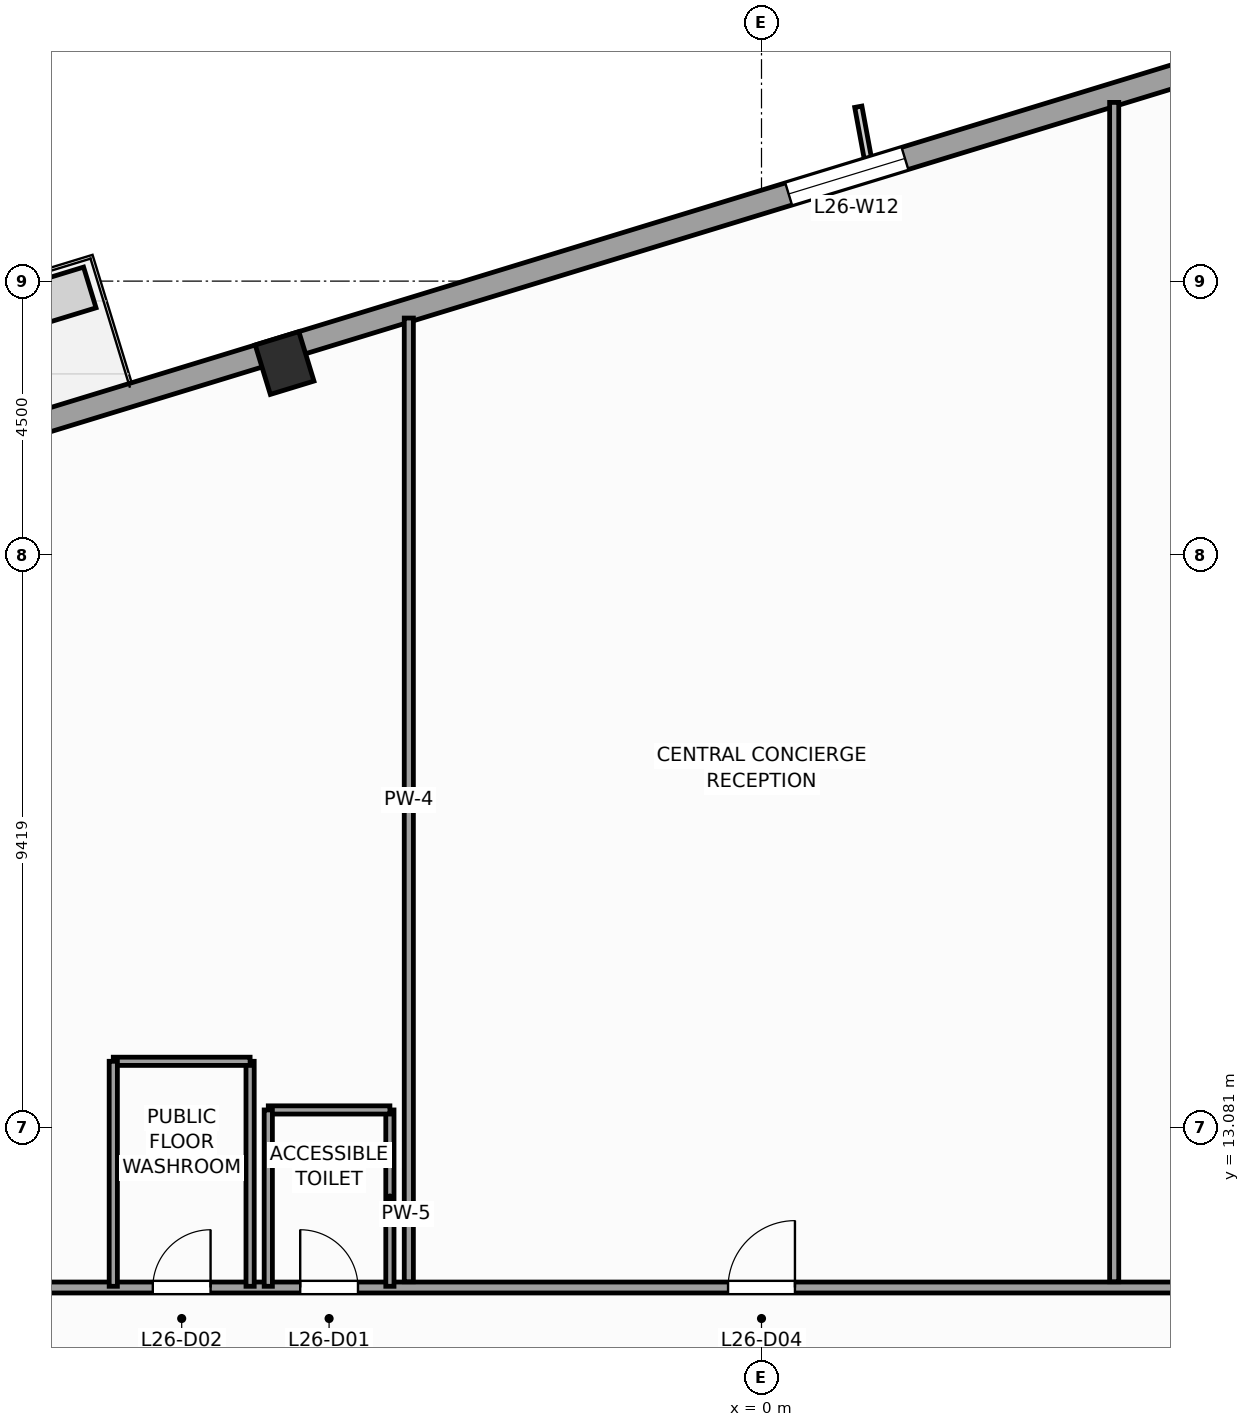
"""IFC4 building model, lengths in metres.
Left out: names, types, materials, properties, quantities, classifications, styles, units other than length and angle.
Written with IfcOpenShell. Run it as: python <this file> out.ifc"""

import sys

from ifc_helpers import new_model, si_unit, direction, frame, frame_2d, origin, origin_2d, place, context, subcontext, project, spatial, rectangle, extrude, source, transform, mapped, element, fill, save


model = new_model("IFC4")
c1 = context("Model", 3, precision=1e-05, world=origin(), true_north=direction((0.0, 1.0)))
c2 = subcontext(c1, "Body", "Model", "MODEL_VIEW")
j1 = project(units=[si_unit("LENGTHUNIT", "METRE"), si_unit("PLANEANGLEUNIT", "RADIAN")], contexts=[c1])
p1 = place(None, origin())
s1 = spatial("IfcSite", under=j1, at=p1, CompositionType="ELEMENT")
p2 = place(p1, origin())
s2 = spatial("IfcBuilding", under=s1, at=p2, CompositionType="ELEMENT")
p3 = place(p2, frame((0.0, 0.0, 111.2)))
s3 = spatial("IfcBuildingStorey", under=s2, at=p3, CompositionType="ELEMENT", Elevation=111.2)
m1 = source(origin(), c2, "Body", "SweptSolid", [
    extrude(rectangle(XDim=0.75, YDim=0.85, at=origin_2d()), origin(), (0.0, 0.0, 1.0), 4.0),
])
p4 = place(p3, frame((-7.843, 25.653, 0.0), z_axis=(0.0, 0.0, 1.0), x_axis=(0.956304755963, 0.292371704723, 0.0)))
e1 = element("IfcColumn", 1, at=p4, inside=s3, PredefinedType="COLUMN", context=c2, shape_type="MappedRepresentation", body=[
    mapped(m1, transform((0.0, 0.0, 0.0), scale=1.0)),
])
p5 = place(p3, frame((14.265, 32.658, 0.0), z_axis=(0.0, 0.0, 1.0), x_axis=(-0.956304320851, -0.292373127906, 0.0)))
e2 = element("IfcWall", 2, at=p5, inside=s3, PredefinedType="STANDARD", context=c2, shape_type="SweptSolid", body=[
    extrude(rectangle(XDim=46.38, YDim=0.38, at=frame_2d((23.19, 0.0))), origin(), (0.0, 0.0, 1.0), 3.14),
])
p6 = place(p5, frame((28.265, 0.0, 0.0)))
e3 = element("IfcOpeningElement", 3, at=p6, cuts=e2, PredefinedType="OPENING", context=c2, shape_type="SweptSolid", body=[
    extrude(rectangle(XDim=1.05, YDim=2.25, at=frame_2d((0.525, 1.125))), frame((0.0, 0.2, 0.0), z_axis=(0.0, -1.0, 0.0), x_axis=(1.0, 0.0, 0.0)), (0.0, 0.0, 1.0), 0.4),
])
p7 = place(p5, frame((4.865, 0.0, 0.51)))
e4 = element("IfcOpeningElement", 4, at=p7, cuts=e2, PredefinedType="OPENING", context=c2, shape_type="SweptSolid", body=[
    extrude(rectangle(XDim=1.4, YDim=2.4, at=frame_2d((0.7, 1.2))), frame((0.0, 0.2, 0.0), z_axis=(0.0, -1.0, 0.0), x_axis=(1.0, 0.0, 0.0)), (0.0, 0.0, 1.0), 0.4),
])
p8 = place(p5, frame((12.45, 0.0, 0.51)))
e5 = element("IfcOpeningElement", 5, at=p8, cuts=e2, PredefinedType="OPENING", context=c2, shape_type="SweptSolid", body=[
    extrude(rectangle(XDim=2.0, YDim=2.4, at=frame_2d((1.0, 1.2))), frame((0.0, 0.2, 0.0), z_axis=(0.0, -1.0, 0.0), x_axis=(1.0, 0.0, 0.0)), (0.0, 0.0, 1.0), 0.4),
])
p9 = place(p5, frame((30.538, 0.0, 0.51)))
e6 = element("IfcOpeningElement", 6, at=p9, cuts=e2, PredefinedType="OPENING", context=c2, shape_type="SweptSolid", body=[
    extrude(rectangle(XDim=2.0, YDim=2.4, at=frame_2d((1.0, 1.2))), frame((0.0, 0.2, 0.0), z_axis=(0.0, -1.0, 0.0), x_axis=(1.0, 0.0, 0.0)), (0.0, 0.0, 1.0), 0.4),
])
p10 = place(p5, frame((39.187, 0.0, 0.51)))
e7 = element("IfcOpeningElement", 7, at=p10, cuts=e2, PredefinedType="OPENING", context=c2, shape_type="SweptSolid", body=[
    extrude(rectangle(XDim=1.4, YDim=2.4, at=frame_2d((0.7, 1.2))), frame((0.0, 0.2, 0.0), z_axis=(0.0, -1.0, 0.0), x_axis=(1.0, 0.0, 0.0)), (0.0, 0.0, 1.0), 0.4),
])
p11 = place(p3, frame((-12.6, 10.45, 0.0), z_axis=(0.0, 0.0, 1.0), x_axis=(1.0, 0.0, 0.0)))
e8 = element("IfcWall", 8, at=p11, inside=s3, PredefinedType="PARTITIONING", context=c2, shape_type="SweptSolid", body=[
    extrude(rectangle(XDim=25.2, YDim=0.18, at=frame_2d((12.6, 0.0))), origin(), (0.0, 0.0, 1.0), 3.74),
])
p12 = place(p11, frame((5.014, 0.0, 0.0)))
e9 = element("IfcOpeningElement", 9, at=p12, cuts=e8, PredefinedType="OPENING", context=c2, shape_type="SweptSolid", body=[
    extrude(rectangle(XDim=0.95, YDim=2.1, at=frame_2d((0.475, 1.05))), frame((0.0, 0.1, 0.0), z_axis=(0.0, -1.0, 0.0), x_axis=(1.0, 0.0, 0.0)), (0.0, 0.0, 1.0), 0.2),
])
p13 = place(p11, frame((2.59, 0.0, 0.0)))
e10 = element("IfcOpeningElement", 10, at=p13, cuts=e8, PredefinedType="OPENING", context=c2, shape_type="SweptSolid", body=[
    extrude(rectangle(XDim=0.95, YDim=2.1, at=frame_2d((0.475, 1.05))), frame((0.0, 0.1, 0.0), z_axis=(0.0, -1.0, 0.0), x_axis=(1.0, 0.0, 0.0)), (0.0, 0.0, 1.0), 0.2),
])
p14 = place(p11, frame((12.05, 0.0, 0.0)))
e11 = element("IfcOpeningElement", 11, at=p14, cuts=e8, PredefinedType="OPENING", context=c2, shape_type="SweptSolid", body=[
    extrude(rectangle(XDim=1.1, YDim=2.2, at=frame_2d((0.55, 1.1))), frame((0.0, 0.1, 0.0), z_axis=(0.0, -1.0, 0.0), x_axis=(1.0, 0.0, 0.0)), (0.0, 0.0, 1.0), 0.2),
])
p15 = place(p3, frame((-5.8, 10.545, 0.0), z_axis=(0.0, 0.0, 1.0), x_axis=(0.0, 1.0, 0.0)))
e12 = element("IfcWall", 12, at=p15, inside=s3, PredefinedType="PARTITIONING", context=c2, shape_type="SweptSolid", body=[
    extrude(rectangle(XDim=15.848, YDim=0.15, at=frame_2d((7.924, 0.0))), origin(), (0.0, 0.0, 1.0), 3.74),
])
p16 = place(p3, frame((5.8, 10.545, 0.0), z_axis=(0.0, 0.0, 1.0), x_axis=(0.0, 1.0, 0.0)))
e13 = element("IfcWall", 13, at=p16, inside=s3, PredefinedType="PARTITIONING", context=c2, shape_type="SweptSolid", body=[
    extrude(rectangle(XDim=19.394, YDim=0.15, at=frame_2d((9.697, 0.0))), origin(), (0.0, 0.0, 1.0), 3.74),
])
p17 = place(p3, frame((-6.111, 10.47, 0.0), z_axis=(0.0, 0.0, 1.0), x_axis=(0.0, 1.0, 0.0)))
e14 = element("IfcWall", 14, at=p17, inside=s3, PredefinedType="PARTITIONING", context=c2, shape_type="SweptSolid", body=[
    extrude(rectangle(XDim=2.9, YDim=0.135, at=frame_2d((1.45, 0.0))), origin(), (0.0, 0.0, 1.0), 3.74),
])
p18 = place(p3, frame((-8.111, 13.37, 0.0), z_axis=(0.0, 0.0, 1.0), x_axis=(1.0, 0.0, 0.0)))
e15 = element("IfcWall", 15, at=p18, inside=s3, PredefinedType="PARTITIONING", context=c2, shape_type="SweptSolid", body=[
    extrude(rectangle(XDim=2.0, YDim=0.135, at=frame_2d((1.0, 0.0))), origin(), (0.0, 0.0, 1.0), 2.732),
])
p19 = place(p3, frame((-8.111, 10.47, 0.0), z_axis=(0.0, 0.0, 1.0), x_axis=(0.0, 1.0, 0.0)))
e16 = element("IfcWall", 16, at=p19, inside=s3, PredefinedType="PARTITIONING", context=c2, shape_type="SweptSolid", body=[
    extrude(rectangle(XDim=2.9, YDim=0.135, at=frame_2d((1.45, 0.0))), origin(), (0.0, 0.0, 1.0), 3.74),
])
p20 = place(p3, frame((-8.41, 10.47, 0.0), z_axis=(0.0, 0.0, 1.0), x_axis=(0.0, 1.0, 0.0)))
e17 = element("IfcWall", 17, at=p20, inside=s3, PredefinedType="PARTITIONING", context=c2, shape_type="SweptSolid", body=[
    extrude(rectangle(XDim=3.7, YDim=0.135, at=frame_2d((1.85, 0.0))), origin(), (0.0, 0.0, 1.0), 3.74),
])
p21 = place(p3, frame((-10.66, 14.17, 0.0), z_axis=(0.0, 0.0, 1.0), x_axis=(1.0, 0.0, 0.0)))
e18 = element("IfcWall", 18, at=p21, inside=s3, PredefinedType="PARTITIONING", context=c2, shape_type="SweptSolid", body=[
    extrude(rectangle(XDim=2.25, YDim=0.135, at=frame_2d((1.125, 0.0))), origin(), (0.0, 0.0, 1.0), 3.74),
])
p22 = place(p3, frame((-10.66, 10.47, 0.0), z_axis=(0.0, 0.0, 1.0), x_axis=(0.0, 1.0, 0.0)))
e19 = element("IfcWall", 19, at=p22, inside=s3, PredefinedType="PARTITIONING", context=c2, shape_type="SweptSolid", body=[
    extrude(rectangle(XDim=3.7, YDim=0.135, at=frame_2d((1.85, 0.0))), origin(), (0.0, 0.0, 1.0), 3.74),
])
m2 = source(origin(), c2, "Body", "SweptSolid", [
    extrude(rectangle(XDim=2.0, YDim=2.4, at=frame_2d((1.0, 1.2))), frame((0.0, 0.03, 0.0), z_axis=(0.0, -1.0, 0.0), x_axis=(1.0, 0.0, 0.0)), (0.0, 0.0, 1.0), 0.06),
])
p23 = place(p8, origin())
e20 = element("IfcWindow", 20, at=p23, inside=s3, PartitioningType="SINGLE_PANEL", PredefinedType="WINDOW", context=c2, shape_type="MappedRepresentation", body=[
    mapped(m2, transform((0.0, 0.0, 0.0), scale=1.0)),
])
fill(e5, e20)
m3 = source(origin(), c2, "Body", "SweptSolid", [
    extrude(rectangle(XDim=0.95, YDim=2.1, at=frame_2d((0.475, 1.05))), frame((0.0, 0.025, 0.0), z_axis=(0.0, -1.0, 0.0), x_axis=(1.0, 0.0, 0.0)), (0.0, 0.0, 1.0), 0.05),
])
p24 = place(p12, origin())
e21 = element("IfcDoor", 21, at=p24, inside=s3, OperationType="SINGLE_SWING_LEFT", PredefinedType="DOOR", context=c2, shape_type="MappedRepresentation", body=[
    mapped(m3, transform((0.0, 0.0, 0.0), scale=1.0)),
])
fill(e9, e21)
p25 = place(p13, origin())
e22 = element("IfcDoor", 22, at=p25, inside=s3, OperationType="SINGLE_SWING_RIGHT", PredefinedType="DOOR", context=c2, shape_type="MappedRepresentation", body=[
    mapped(m3, transform((0.0, 0.0, 0.0), scale=1.0)),
])
fill(e10, e22)
m4 = source(origin(), c2, "Body", "SweptSolid", [
    extrude(rectangle(XDim=1.1, YDim=2.2, at=frame_2d((0.55, 1.1))), frame((0.0, 0.025, 0.0), z_axis=(0.0, -1.0, 0.0), x_axis=(1.0, 0.0, 0.0)), (0.0, 0.0, 1.0), 0.05),
])
p26 = place(p14, origin())
e23 = element("IfcDoor", 23, at=p26, inside=s3, OperationType="SINGLE_SWING_RIGHT", PredefinedType="DOOR", context=c2, shape_type="MappedRepresentation", body=[
    mapped(m4, transform((0.0, 0.0, 0.0), scale=1.0)),
])
fill(e11, e23)
save(model, sys.argv[1])
